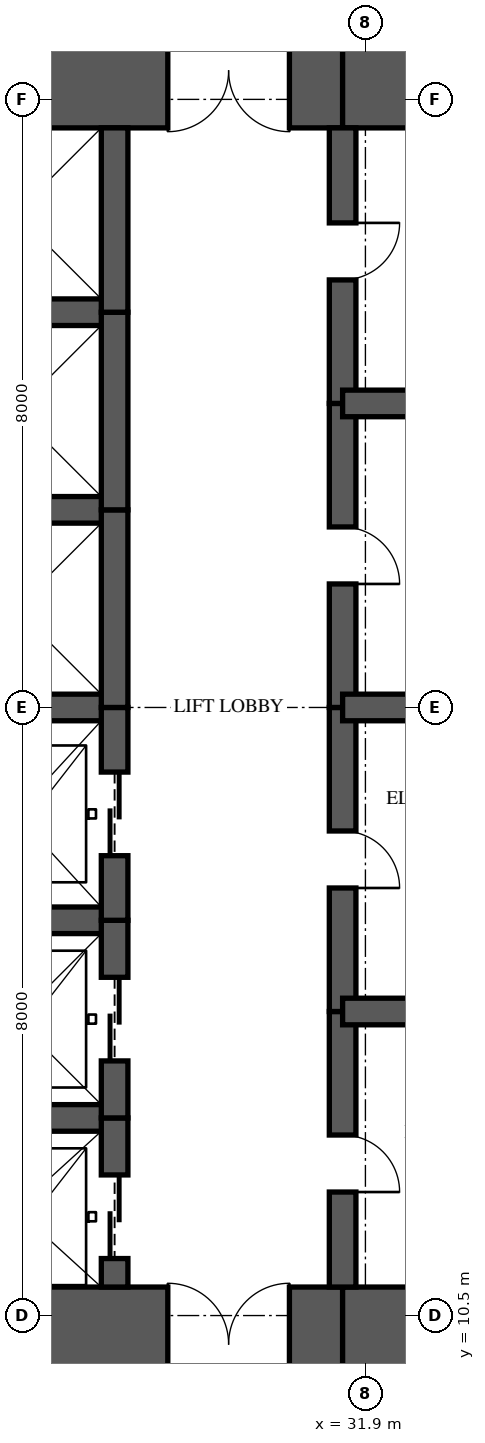
"""IFC4 building model, lengths in metres.
Left out: names, types, materials, properties, quantities, classifications, styles, units other than length and angle.
Written with IfcOpenShell. Run it as: python <this file> out.ifc"""

import sys

from ifc_helpers import new_model, si_unit, direction, frame, frame_2d, origin, place, context, subcontext, project, spatial, rectangle, extrude, element, fill, save


model = new_model("IFC4")
c1 = context("Model", 3, precision=1e-05, world=origin(), true_north=direction((0.0, 1.0)))
c2 = subcontext(c1, "Body", "Model", "MODEL_VIEW")
j1 = project(units=[si_unit("LENGTHUNIT", "METRE"), si_unit("PLANEANGLEUNIT", "RADIAN")], contexts=[c1])
p1 = place(None, origin())
s1 = spatial("IfcSite", under=j1, at=p1, CompositionType="ELEMENT")
p2 = place(p1, origin())
s2 = spatial("IfcBuilding", under=s1, at=p2, CompositionType="ELEMENT")
p3 = place(p2, frame((0.0, 0.0, 108.2)))
s3 = spatial("IfcBuildingStorey", under=s2, at=p3, CompositionType="ELEMENT", Elevation=108.2)
p4 = place(p3, frame((26.0, 10.125, 0.0), z_axis=(0.0, 0.0, 1.0), x_axis=(1.0, 0.0, 0.0)))
e1 = element("IfcWall", 1, at=p4, inside=s3, PredefinedType="SHEAR", context=c2, shape_type="SweptSolid", body=[
    extrude(rectangle(XDim=5.6, YDim=1.5, at=frame_2d((2.8, 0.0))), origin(), (0.0, 0.0, 1.0), 3.35),
])
p5 = place(p4, frame((3.3, 0.0, 0.0)))
e2 = element("IfcOpeningElement", 2, at=p5, cuts=e1, PredefinedType="OPENING", context=c2, shape_type="SweptSolid", body=[
    extrude(rectangle(XDim=1.6, YDim=2.1, at=frame_2d((0.8, 1.05))), frame((0.0, 0.76, 0.0), z_axis=(0.0, -1.0, 0.0), x_axis=(1.0, 0.0, 0.0)), (0.0, 0.0, 1.0), 1.52),
])
for number, where, z_axis, x_axis in (
    (3, (31.6, 10.125, 0.0), (0.0, 0.0, 1.0), (1.0, 0.0, 0.0)),
    (4, (35.9, 26.875, 0.0), (0.0, 0.0, 1.0), (-1.0, 0.0, 0.0)),
):
    element("IfcWall", number, at=place(p3, frame(where, z_axis=z_axis, x_axis=x_axis)), inside=s3, PredefinedType="SHEAR", context=c2, shape_type="SweptSolid", body=[
        extrude(rectangle(XDim=4.3, YDim=1.5, at=frame_2d((2.15, 0.0))), origin(), (0.0, 0.0, 1.0), 3.35),
    ])
p6 = place(p3, frame((31.6, 26.875, 0.0), z_axis=(0.0, 0.0, 1.0), x_axis=(-1.0, 0.0, 0.0)))
e5 = element("IfcWall", 5, at=p6, inside=s3, PredefinedType="SHEAR", context=c2, shape_type="SweptSolid", body=[
    extrude(rectangle(XDim=5.6, YDim=1.5, at=frame_2d((2.8, 0.0))), origin(), (0.0, 0.0, 1.0), 3.35),
])
p7 = place(p6, frame((0.7, 0.0, 0.0)))
e6 = element("IfcOpeningElement", 6, at=p7, cuts=e5, PredefinedType="OPENING", context=c2, shape_type="SweptSolid", body=[
    extrude(rectangle(XDim=1.6, YDim=2.1, at=frame_2d((0.8, 1.05))), frame((0.0, 0.76, 0.0), z_axis=(0.0, -1.0, 0.0), x_axis=(1.0, 0.0, 0.0)), (0.0, 0.0, 1.0), 1.52),
])
p8 = place(p3, frame((28.6, 10.875, 0.0), z_axis=(0.0, 0.0, 1.0), x_axis=(0.0, 1.0, 0.0)))
e7 = element("IfcWall", 7, at=p8, inside=s3, PredefinedType="SHEAR", context=c2, shape_type="SweptSolid", body=[
    extrude(rectangle(XDim=2.225, YDim=0.35, at=frame_2d((1.113, 0.0))), origin(), (0.0, 0.0, 1.0), 3.35),
])
p9 = place(p8, frame((0.375, 0.0, 0.0)))
e8 = element("IfcOpeningElement", 8, at=p9, cuts=e7, PredefinedType="OPENING", context=c2, shape_type="SweptSolid", body=[
    extrude(rectangle(XDim=1.1, YDim=2.1, at=frame_2d((0.55, 1.05))), frame((0.0, 0.185, 0.0), z_axis=(0.0, -1.0, 0.0), x_axis=(1.0, 0.0, 0.0)), (0.0, 0.0, 1.0), 0.37),
])
p10 = place(p3, frame((28.6, 13.1, 0.0), z_axis=(0.0, 0.0, 1.0), x_axis=(0.0, 1.0, 0.0)))
e9 = element("IfcWall", 9, at=p10, inside=s3, PredefinedType="SHEAR", context=c2, shape_type="SweptSolid", body=[
    extrude(rectangle(XDim=2.6, YDim=0.35, at=frame_2d((1.3, 0.0))), origin(), (0.0, 0.0, 1.0), 3.35),
])
p11 = place(p10, frame((0.75, 0.0, 0.0)))
e10 = element("IfcOpeningElement", 10, at=p11, cuts=e9, PredefinedType="OPENING", context=c2, shape_type="SweptSolid", body=[
    extrude(rectangle(XDim=1.1, YDim=2.1, at=frame_2d((0.55, 1.05))), frame((0.0, 0.185, 0.0), z_axis=(0.0, -1.0, 0.0), x_axis=(1.0, 0.0, 0.0)), (0.0, 0.0, 1.0), 0.37),
])
p12 = place(p3, frame((28.6, 15.7, 0.0), z_axis=(0.0, 0.0, 1.0), x_axis=(0.0, 1.0, 0.0)))
e11 = element("IfcWall", 11, at=p12, inside=s3, PredefinedType="SHEAR", context=c2, shape_type="SweptSolid", body=[
    extrude(rectangle(XDim=2.8, YDim=0.35, at=frame_2d((1.4, 0.0))), origin(), (0.0, 0.0, 1.0), 3.35),
])
p13 = place(p12, frame((0.85, 0.0, 0.0)))
e12 = element("IfcOpeningElement", 12, at=p13, cuts=e11, PredefinedType="OPENING", context=c2, shape_type="SweptSolid", body=[
    extrude(rectangle(XDim=1.1, YDim=2.1, at=frame_2d((0.55, 1.05))), frame((0.0, 0.185, 0.0), z_axis=(0.0, -1.0, 0.0), x_axis=(1.0, 0.0, 0.0)), (0.0, 0.0, 1.0), 0.37),
])
p14 = place(p3, frame((28.6, 18.5, 0.0), z_axis=(0.0, 0.0, 1.0), x_axis=(0.0, 1.0, 0.0)))
e13 = element("IfcWall", 13, at=p14, inside=s3, PredefinedType="SHEAR", context=c2, shape_type="SweptSolid", body=[
    extrude(rectangle(XDim=2.6, YDim=0.35, at=frame_2d((1.3, 0.0))), origin(), (0.0, 0.0, 1.0), 3.35),
])
p15 = place(p3, frame((28.6, 21.1, 0.0), z_axis=(0.0, 0.0, 1.0), x_axis=(0.0, 1.0, 0.0)))
e14 = element("IfcWall", 14, at=p15, inside=s3, PredefinedType="SHEAR", context=c2, shape_type="SweptSolid", body=[
    extrude(rectangle(XDim=2.6, YDim=0.35, at=frame_2d((1.3, 0.0))), origin(), (0.0, 0.0, 1.0), 3.35),
])
p16 = place(p3, frame((28.6, 23.7, 0.0), z_axis=(0.0, 0.0, 1.0), x_axis=(0.0, 1.0, 0.0)))
e15 = element("IfcWall", 15, at=p16, inside=s3, PredefinedType="SHEAR", context=c2, shape_type="SweptSolid", body=[
    extrude(rectangle(XDim=2.425, YDim=0.35, at=frame_2d((1.212, 0.0))), origin(), (0.0, 0.0, 1.0), 3.35),
])
p17 = place(p3, frame((31.6, 10.875, 0.0), z_axis=(0.0, 0.0, 1.0), x_axis=(0.0, 1.0, 0.0)))
e16 = element("IfcWall", 16, at=p17, inside=s3, PredefinedType="SHEAR", context=c2, shape_type="SweptSolid", body=[
    extrude(rectangle(XDim=3.625, YDim=0.35, at=frame_2d((1.812, 0.0))), origin(), (0.0, 0.0, 1.0), 3.35),
])
p18 = place(p17, frame((1.25, 0.0, 0.0)))
e17 = element("IfcOpeningElement", 17, at=p18, cuts=e16, PredefinedType="OPENING", context=c2, shape_type="SweptSolid", body=[
    extrude(rectangle(XDim=0.75, YDim=2.1, at=frame_2d((0.375, 1.05))), frame((0.0, 0.185, 0.0), z_axis=(0.0, -1.0, 0.0), x_axis=(1.0, 0.0, 0.0)), (0.0, 0.0, 1.0), 0.37),
])
p19 = place(p3, frame((31.6, 14.5, 0.0), z_axis=(0.0, 0.0, 1.0), x_axis=(0.0, 1.0, 0.0)))
e18 = element("IfcWall", 18, at=p19, inside=s3, PredefinedType="SHEAR", context=c2, shape_type="SweptSolid", body=[
    extrude(rectangle(XDim=4.0, YDim=0.35, at=frame_2d((2.0, 0.0))), origin(), (0.0, 0.0, 1.0), 3.35),
])
p20 = place(p19, frame((1.625, 0.0, 0.0)))
e19 = element("IfcOpeningElement", 19, at=p20, cuts=e18, PredefinedType="OPENING", context=c2, shape_type="SweptSolid", body=[
    extrude(rectangle(XDim=0.75, YDim=2.1, at=frame_2d((0.375, 1.05))), frame((0.0, 0.185, 0.0), z_axis=(0.0, -1.0, 0.0), x_axis=(1.0, 0.0, 0.0)), (0.0, 0.0, 1.0), 0.37),
])
p21 = place(p3, frame((31.6, 18.5, 0.0), z_axis=(0.0, 0.0, 1.0), x_axis=(0.0, 1.0, 0.0)))
e20 = element("IfcWall", 20, at=p21, inside=s3, PredefinedType="SHEAR", context=c2, shape_type="SweptSolid", body=[
    extrude(rectangle(XDim=4.0, YDim=0.35, at=frame_2d((2.0, 0.0))), origin(), (0.0, 0.0, 1.0), 3.35),
])
p22 = place(p21, frame((1.625, 0.0, 0.0)))
e21 = element("IfcOpeningElement", 21, at=p22, cuts=e20, PredefinedType="OPENING", context=c2, shape_type="SweptSolid", body=[
    extrude(rectangle(XDim=0.75, YDim=2.1, at=frame_2d((0.375, 1.05))), frame((0.0, 0.185, 0.0), z_axis=(0.0, -1.0, 0.0), x_axis=(1.0, 0.0, 0.0)), (0.0, 0.0, 1.0), 0.37),
])
p23 = place(p3, frame((31.6, 22.5, 0.0), z_axis=(0.0, 0.0, 1.0), x_axis=(0.0, 1.0, 0.0)))
e22 = element("IfcWall", 22, at=p23, inside=s3, PredefinedType="SHEAR", context=c2, shape_type="SweptSolid", body=[
    extrude(rectangle(XDim=3.625, YDim=0.35, at=frame_2d((1.812, 0.0))), origin(), (0.0, 0.0, 1.0), 3.35),
])
p24 = place(p23, frame((1.625, 0.0, 0.0)))
e23 = element("IfcOpeningElement", 23, at=p24, cuts=e22, PredefinedType="OPENING", context=c2, shape_type="SweptSolid", body=[
    extrude(rectangle(XDim=0.75, YDim=2.1, at=frame_2d((0.375, 1.05))), frame((0.0, 0.185, 0.0), z_axis=(0.0, -1.0, 0.0), x_axis=(1.0, 0.0, 0.0)), (0.0, 0.0, 1.0), 0.37),
])
for number, where, z_axis, x_axis in (
    (24, (26.0, 13.1, 0.0), (0.0, 0.0, 1.0), (1.0, 0.0, 0.0)),
    (25, (26.0, 15.7, 0.0), (0.0, 0.0, 1.0), (1.0, 0.0, 0.0)),
    (26, (26.0, 18.5, 0.0), (0.0, 0.0, 1.0), (1.0, 0.0, 0.0)),
    (27, (26.0, 21.1, 0.0), (0.0, 0.0, 1.0), (1.0, 0.0, 0.0)),
    (28, (26.0, 23.7, 0.0), (0.0, 0.0, 1.0), (1.0, 0.0, 0.0)),
):
    element("IfcWall", number, at=place(p3, frame(where, z_axis=z_axis, x_axis=x_axis)), inside=s3, PredefinedType="SHEAR", context=c2, shape_type="SweptSolid", body=[
        extrude(rectangle(XDim=2.6, YDim=0.35, at=frame_2d((1.3, 0.0))), origin(), (0.0, 0.0, 1.0), 3.35),
    ])
for number, where, z_axis, x_axis in (
    (29, (31.6, 14.5, 0.0), (0.0, 0.0, 1.0), (1.0, 0.0, 0.0)),
    (30, (31.6, 18.5, 0.0), (0.0, 0.0, 1.0), (1.0, 0.0, 0.0)),
    (31, (31.6, 22.5, 0.0), (0.0, 0.0, 1.0), (1.0, 0.0, 0.0)),
):
    element("IfcWall", number, at=place(p3, frame(where, z_axis=z_axis, x_axis=x_axis)), inside=s3, PredefinedType="SHEAR", context=c2, shape_type="SweptSolid", body=[
        extrude(rectangle(XDim=4.3, YDim=0.35, at=frame_2d((2.15, 0.0))), origin(), (0.0, 0.0, 1.0), 3.35),
    ])
p25 = place(p9, origin())
e32 = element("IfcDoor", 32, at=p25, inside=s3, OperationType="SLIDING_TO_LEFT", PredefinedType="DOOR", context=c2, shape_type="SweptSolid", body=[
    extrude(rectangle(XDim=1.1, YDim=2.1, at=frame_2d((0.55, 1.05))), frame((0.0, 0.025, 0.0), z_axis=(0.0, -1.0, 0.0), x_axis=(1.0, 0.0, 0.0)), (0.0, 0.0, 1.0), 0.05),
])
fill(e8, e32)
p26 = place(p11, origin())
e33 = element("IfcDoor", 33, at=p26, inside=s3, OperationType="SLIDING_TO_LEFT", PredefinedType="DOOR", context=c2, shape_type="SweptSolid", body=[
    extrude(rectangle(XDim=1.1, YDim=2.1, at=frame_2d((0.55, 1.05))), frame((0.0, 0.025, 0.0), z_axis=(0.0, -1.0, 0.0), x_axis=(1.0, 0.0, 0.0)), (0.0, 0.0, 1.0), 0.05),
])
fill(e10, e33)
p27 = place(p13, origin())
e34 = element("IfcDoor", 34, at=p27, inside=s3, OperationType="SLIDING_TO_LEFT", PredefinedType="DOOR", context=c2, shape_type="SweptSolid", body=[
    extrude(rectangle(XDim=1.1, YDim=2.1, at=frame_2d((0.55, 1.05))), frame((0.0, 0.025, 0.0), z_axis=(0.0, -1.0, 0.0), x_axis=(1.0, 0.0, 0.0)), (0.0, 0.0, 1.0), 0.05),
])
fill(e12, e34)
p28 = place(p5, origin())
e35 = element("IfcDoor", 35, at=p28, inside=s3, OperationType="DOUBLE_DOOR_SINGLE_SWING", PredefinedType="DOOR", context=c2, shape_type="SweptSolid", body=[
    extrude(rectangle(XDim=1.6, YDim=2.1, at=frame_2d((0.8, 1.05))), frame((0.0, 0.025, 0.0), z_axis=(0.0, -1.0, 0.0), x_axis=(1.0, 0.0, 0.0)), (0.0, 0.0, 1.0), 0.05),
])
fill(e2, e35)
p29 = place(p7, origin())
e36 = element("IfcDoor", 36, at=p29, inside=s3, OperationType="DOUBLE_DOOR_SINGLE_SWING", PredefinedType="DOOR", context=c2, shape_type="SweptSolid", body=[
    extrude(rectangle(XDim=1.6, YDim=2.1, at=frame_2d((0.8, 1.05))), frame((0.0, 0.025, 0.0), z_axis=(0.0, -1.0, 0.0), x_axis=(1.0, 0.0, 0.0)), (0.0, 0.0, 1.0), 0.05),
])
fill(e6, e36)
p30 = place(p18, frame((0.75, 0.0, 0.0), z_axis=(0.0, 0.0, 1.0), x_axis=(-1.0, 0.0, 0.0)))
e37 = element("IfcDoor", 37, at=p30, inside=s3, OperationType="SINGLE_SWING_RIGHT", PredefinedType="DOOR", context=c2, shape_type="SweptSolid", body=[
    extrude(rectangle(XDim=0.75, YDim=2.1, at=frame_2d((0.375, 1.05))), frame((0.0, 0.025, 0.0), z_axis=(0.0, -1.0, 0.0), x_axis=(1.0, 0.0, 0.0)), (0.0, 0.0, 1.0), 0.05),
])
fill(e17, e37)
p31 = place(p20, frame((0.75, 0.0, 0.0), z_axis=(0.0, 0.0, 1.0), x_axis=(-1.0, 0.0, 0.0)))
e38 = element("IfcDoor", 38, at=p31, inside=s3, OperationType="SINGLE_SWING_RIGHT", PredefinedType="DOOR", context=c2, shape_type="SweptSolid", body=[
    extrude(rectangle(XDim=0.75, YDim=2.1, at=frame_2d((0.375, 1.05))), frame((0.0, 0.025, 0.0), z_axis=(0.0, -1.0, 0.0), x_axis=(1.0, 0.0, 0.0)), (0.0, 0.0, 1.0), 0.05),
])
fill(e19, e38)
p32 = place(p22, frame((0.75, 0.0, 0.0), z_axis=(0.0, 0.0, 1.0), x_axis=(-1.0, 0.0, 0.0)))
e39 = element("IfcDoor", 39, at=p32, inside=s3, OperationType="SINGLE_SWING_RIGHT", PredefinedType="DOOR", context=c2, shape_type="SweptSolid", body=[
    extrude(rectangle(XDim=0.75, YDim=2.1, at=frame_2d((0.375, 1.05))), frame((0.0, 0.025, 0.0), z_axis=(0.0, -1.0, 0.0), x_axis=(1.0, 0.0, 0.0)), (0.0, 0.0, 1.0), 0.05),
])
fill(e21, e39)
p33 = place(p24, frame((0.75, 0.0, 0.0), z_axis=(0.0, 0.0, 1.0), x_axis=(-1.0, 0.0, 0.0)))
e40 = element("IfcDoor", 40, at=p33, inside=s3, OperationType="SINGLE_SWING_LEFT", PredefinedType="DOOR", context=c2, shape_type="SweptSolid", body=[
    extrude(rectangle(XDim=0.75, YDim=2.1, at=frame_2d((0.375, 1.05))), frame((0.0, 0.025, 0.0), z_axis=(0.0, -1.0, 0.0), x_axis=(1.0, 0.0, 0.0)), (0.0, 0.0, 1.0), 0.05),
])
fill(e23, e40)
save(model, sys.argv[1])
